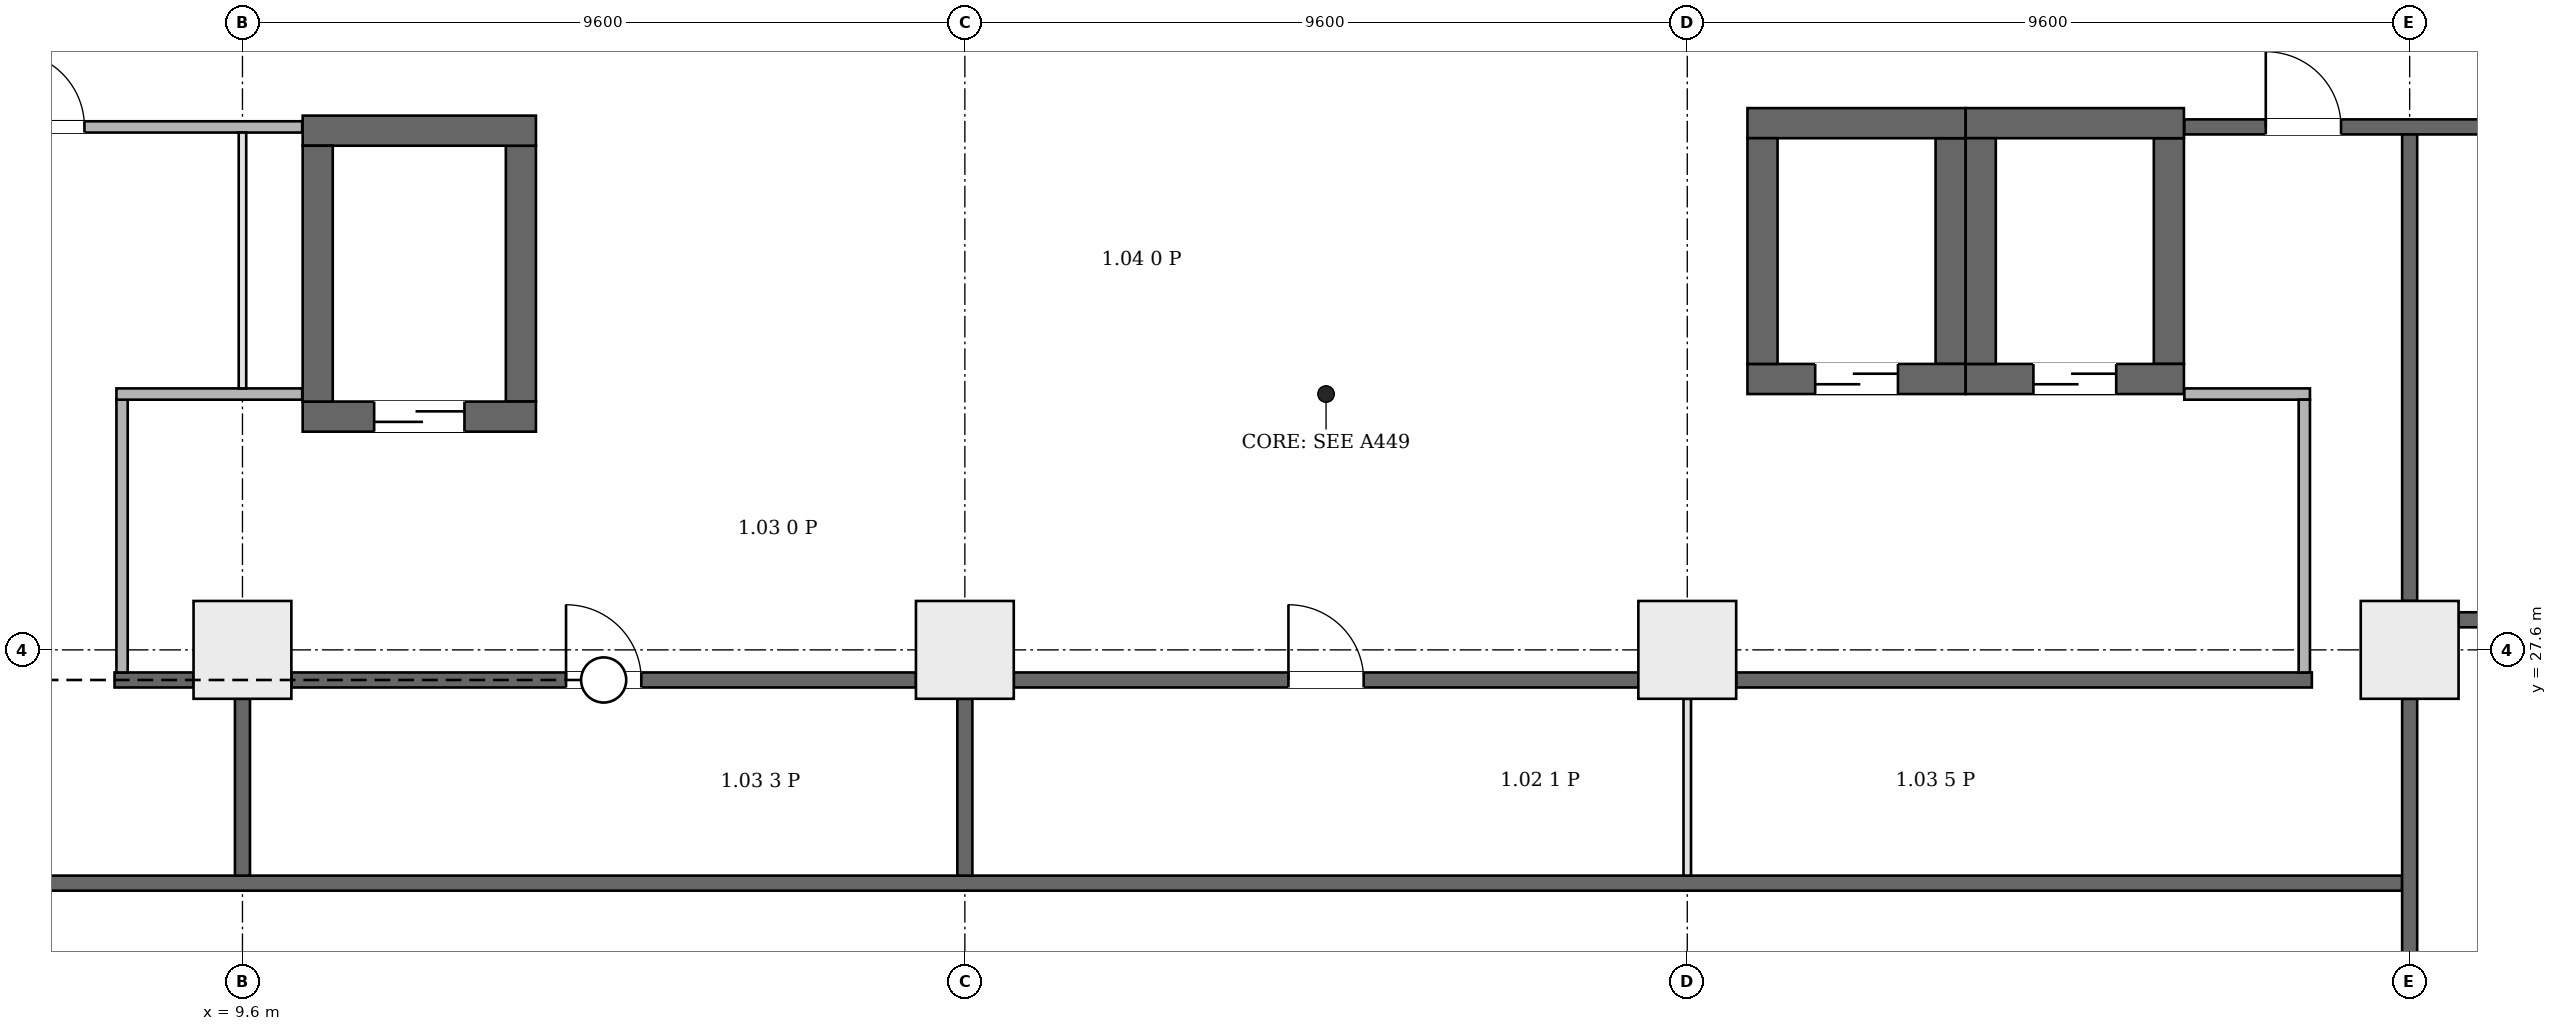
"""IFC4 building model, lengths in metres.
Left out: names, types, materials, properties, quantities, classifications, styles, units other than length and angle.
Written with IfcOpenShell. Run it as: python <this file> out.ifc"""

import sys

from ifc_helpers import new_model, si_unit, direction, frame, frame_2d, origin, origin_2d, place, context, subcontext, project, spatial, rectangle, extrude, element, fill, save


model = new_model("IFC4")
c1 = context("Model", 3, precision=1e-05, world=origin(), true_north=direction((0.0, 1.0)))
c2 = subcontext(c1, "Body", "Model", "MODEL_VIEW")
j1 = project(units=[si_unit("LENGTHUNIT", "METRE"), si_unit("PLANEANGLEUNIT", "RADIAN")], contexts=[c1])
p1 = place(None, origin())
s1 = spatial("IfcSite", under=j1, at=p1, CompositionType="ELEMENT")
p2 = place(p1, origin())
s2 = spatial("IfcBuilding", under=s1, at=p2, CompositionType="ELEMENT")
p3 = place(p2, frame((0.0, 0.0, 6.5)))
s3 = spatial("IfcBuildingStorey", under=s2, at=p3, CompositionType="ELEMENT", Elevation=6.5)
p4 = place(p3, frame((10.4, 30.7, 0.0), z_axis=(0.0, 0.0, 1.0), x_axis=(1.0, 0.0, 0.0)))
e1 = element("IfcWall", 1, at=p4, inside=s3, PredefinedType="SHEAR", context=c2, shape_type="SweptSolid", body=[
    extrude(rectangle(XDim=3.1, YDim=0.4, at=frame_2d((1.55, 0.0))), origin(), (0.0, 0.0, 1.0), 7.7),
])
p5 = place(p4, frame((0.95, 0.0, 0.0)))
e2 = element("IfcOpeningElement", 2, at=p5, cuts=e1, PredefinedType="OPENING", context=c2, shape_type="SweptSolid", body=[
    extrude(rectangle(XDim=1.2, YDim=2.1, at=frame_2d((0.6, 1.05))), frame((0.0, 0.21, 0.0), z_axis=(0.0, -1.0, 0.0), x_axis=(1.0, 0.0, 0.0)), (0.0, 0.0, 1.0), 0.42),
])
p6 = place(p3, frame((10.4, 34.5, 0.0), z_axis=(0.0, 0.0, 1.0), x_axis=(1.0, 0.0, 0.0)))
e3 = element("IfcWall", 3, at=p6, inside=s3, PredefinedType="SHEAR", context=c2, shape_type="SweptSolid", body=[
    extrude(rectangle(XDim=3.1, YDim=0.4, at=frame_2d((1.55, 0.0))), origin(), (0.0, 0.0, 1.0), 7.7),
])
for number, where, z_axis, x_axis in (
    (4, (10.6, 30.9, 0.0), (0.0, 0.0, 1.0), (0.0, 1.0, 0.0)),
    (5, (13.3, 30.9, 0.0), (0.0, 0.0, 1.0), (0.0, 1.0, 0.0)),
):
    element("IfcWall", number, at=place(p3, frame(where, z_axis=z_axis, x_axis=x_axis)), inside=s3, PredefinedType="SHEAR", context=c2, shape_type="SweptSolid", body=[
        extrude(rectangle(XDim=3.4, YDim=0.4, at=frame_2d((1.7, 0.0))), origin(), (0.0, 0.0, 1.0), 7.7),
    ])
p7 = place(p3, frame((29.6, 31.2, 0.0), z_axis=(0.0, 0.0, 1.0), x_axis=(1.0, 0.0, 0.0)))
e6 = element("IfcWall", 6, at=p7, inside=s3, PredefinedType="SHEAR", context=c2, shape_type="SweptSolid", body=[
    extrude(rectangle(XDim=2.9, YDim=0.4, at=frame_2d((1.45, 0.0))), origin(), (0.0, 0.0, 1.0), 7.7),
])
p8 = place(p7, frame((0.9, 0.0, 0.0)))
e7 = element("IfcOpeningElement", 7, at=p8, cuts=e6, PredefinedType="OPENING", context=c2, shape_type="SweptSolid", body=[
    extrude(rectangle(XDim=1.1, YDim=2.1, at=frame_2d((0.55, 1.05))), frame((0.0, 0.21, 0.0), z_axis=(0.0, -1.0, 0.0), x_axis=(1.0, 0.0, 0.0)), (0.0, 0.0, 1.0), 0.42),
])
p9 = place(p3, frame((29.6, 34.6, 0.0), z_axis=(0.0, 0.0, 1.0), x_axis=(1.0, 0.0, 0.0)))
e8 = element("IfcWall", 8, at=p9, inside=s3, PredefinedType="SHEAR", context=c2, shape_type="SweptSolid", body=[
    extrude(rectangle(XDim=2.9, YDim=0.4, at=frame_2d((1.45, 0.0))), origin(), (0.0, 0.0, 1.0), 7.7),
])
for number, where, z_axis, x_axis in (
    (9, (29.8, 31.4, 0.0), (0.0, 0.0, 1.0), (0.0, 1.0, 0.0)),
    (10, (32.3, 31.4, 0.0), (0.0, 0.0, 1.0), (0.0, 1.0, 0.0)),
):
    element("IfcWall", number, at=place(p3, frame(where, z_axis=z_axis, x_axis=x_axis)), inside=s3, PredefinedType="SHEAR", context=c2, shape_type="SweptSolid", body=[
        extrude(rectangle(XDim=3.0, YDim=0.4, at=frame_2d((1.5, 0.0))), origin(), (0.0, 0.0, 1.0), 7.7),
    ])
p10 = place(p3, frame((32.5, 31.2, 0.0), z_axis=(0.0, 0.0, 1.0), x_axis=(1.0, 0.0, 0.0)))
e11 = element("IfcWall", 11, at=p10, inside=s3, PredefinedType="SHEAR", context=c2, shape_type="SweptSolid", body=[
    extrude(rectangle(XDim=2.9, YDim=0.4, at=frame_2d((1.45, 0.0))), origin(), (0.0, 0.0, 1.0), 7.7),
])
p11 = place(p10, frame((0.9, 0.0, 0.0)))
e12 = element("IfcOpeningElement", 12, at=p11, cuts=e11, PredefinedType="OPENING", context=c2, shape_type="SweptSolid", body=[
    extrude(rectangle(XDim=1.1, YDim=2.1, at=frame_2d((0.55, 1.05))), frame((0.0, 0.21, 0.0), z_axis=(0.0, -1.0, 0.0), x_axis=(1.0, 0.0, 0.0)), (0.0, 0.0, 1.0), 0.42),
])
p12 = place(p3, frame((32.5, 34.6, 0.0), z_axis=(0.0, 0.0, 1.0), x_axis=(1.0, 0.0, 0.0)))
e13 = element("IfcWall", 13, at=p12, inside=s3, PredefinedType="SHEAR", context=c2, shape_type="SweptSolid", body=[
    extrude(rectangle(XDim=2.9, YDim=0.4, at=frame_2d((1.45, 0.0))), origin(), (0.0, 0.0, 1.0), 7.7),
])
for number, where, z_axis, x_axis in (
    (14, (32.7, 31.4, 0.0), (0.0, 0.0, 1.0), (0.0, 1.0, 0.0)),
    (15, (35.2, 31.4, 0.0), (0.0, 0.0, 1.0), (0.0, 1.0, 0.0)),
):
    element("IfcWall", number, at=place(p3, frame(where, z_axis=z_axis, x_axis=x_axis)), inside=s3, PredefinedType="SHEAR", context=c2, shape_type="SweptSolid", body=[
        extrude(rectangle(XDim=3.0, YDim=0.4, at=frame_2d((1.5, 0.0))), origin(), (0.0, 0.0, 1.0), 7.7),
    ])
for number, where, z_axis, x_axis in (
    (16, (9.6, 27.6, 0.0), (0.0, 0.0, 1.0), (1.0, 0.0, 0.0)),
    (17, (19.2, 27.6, 0.0), (0.0, 0.0, 1.0), (1.0, 0.0, 0.0)),
    (18, (28.8, 27.6, 0.0), (0.0, 0.0, 1.0), (1.0, 0.0, 0.0)),
    (19, (38.4, 27.6, 0.0), (0.0, 0.0, 1.0), (1.0, 0.0, 0.0)),
):
    element("IfcColumn", number, at=place(p3, frame(where, z_axis=z_axis, x_axis=x_axis)), inside=s3, PredefinedType="COLUMN", context=c2, shape_type="SweptSolid", body=[
        extrude(rectangle(XDim=1.3, YDim=1.3, at=origin_2d()), origin(), (0.0, 0.0, 1.0), 7.7),
    ])
p13 = place(p3, frame((0.206, 24.5, 0.0), z_axis=(0.0, 0.0, 1.0), x_axis=(1.0, 0.0, 0.0)))
e20 = element("IfcWall", 20, at=p13, inside=s3, PredefinedType="PARTITIONING", context=c2, shape_type="SweptSolid", body=[
    extrude(rectangle(XDim=38.094, YDim=0.2, at=frame_2d((19.047, 0.0))), origin(), (0.0, 0.0, 1.0), 7.35),
])
p14 = place(p3, frame((2.706, 34.55, 0.0), z_axis=(0.0, 0.0, 1.0), x_axis=(1.0, 0.0, 0.0)))
e21 = element("IfcWall", 21, at=p14, inside=s3, PredefinedType="PARTITIONING", context=c2, shape_type="SweptSolid", body=[
    extrude(rectangle(XDim=7.688, YDim=0.15, at=frame_2d((3.844, 0.0))), origin(), (0.0, 0.0, 1.0), 7.35),
])
p15 = place(p14, frame((3.794, 0.0, 0.0)))
e22 = element("IfcOpeningElement", 22, at=p15, cuts=e21, PredefinedType="OPENING", context=c2, shape_type="SweptSolid", body=[
    extrude(rectangle(XDim=1.0, YDim=2.1, at=frame_2d((0.5, 1.05))), frame((0.0, 0.085, 0.0), z_axis=(0.0, -1.0, 0.0), x_axis=(1.0, 0.0, 0.0)), (0.0, 0.0, 1.0), 0.17),
])
p16 = place(p3, frame((7.9, 27.2, 0.0), z_axis=(0.0, 0.0, 1.0), x_axis=(1.0, 0.0, 0.0)))
e23 = element("IfcWall", 23, at=p16, inside=s3, PredefinedType="PARTITIONING", context=c2, shape_type="SweptSolid", body=[
    extrude(rectangle(XDim=1.05, YDim=0.2, at=frame_2d((0.525, 0.0))), origin(), (0.0, 0.0, 1.0), 7.35),
])
p17 = place(p3, frame((8.0, 27.3, 0.0), z_axis=(0.0, 0.0, 1.0), x_axis=(0.0, 1.0, 0.0)))
e24 = element("IfcWall", 24, at=p17, inside=s3, PredefinedType="PARTITIONING", context=c2, shape_type="SweptSolid", body=[
    extrude(rectangle(XDim=3.625, YDim=0.15, at=frame_2d((1.812, 0.0))), origin(), (0.0, 0.0, 1.0), 7.35),
])
p18 = place(p3, frame((7.925, 31.0, 0.0), z_axis=(0.0, 0.0, 1.0), x_axis=(1.0, 0.0, 0.0)))
e25 = element("IfcWall", 25, at=p18, inside=s3, PredefinedType="PARTITIONING", context=c2, shape_type="SweptSolid", body=[
    extrude(rectangle(XDim=2.469, YDim=0.15, at=frame_2d((1.234, 0.0))), origin(), (0.0, 0.0, 1.0), 7.35),
])
p19 = place(p3, frame((9.6, 24.6, 0.0), z_axis=(0.0, 0.0, 1.0), x_axis=(0.0, 1.0, 0.0)))
e26 = element("IfcWall", 26, at=p19, inside=s3, PredefinedType="PARTITIONING", context=c2, shape_type="SweptSolid", body=[
    extrude(rectangle(XDim=2.35, YDim=0.2, at=frame_2d((1.175, 0.0))), origin(), (0.0, 0.0, 1.0), 6.95),
])
p20 = place(p3, frame((9.6, 31.075, 0.0), z_axis=(0.0, 0.0, 1.0), x_axis=(0.0, 1.0, 0.0)))
e27 = element("IfcWall", 27, at=p20, inside=s3, PredefinedType="PARTITIONING", context=c2, shape_type="SweptSolid", body=[
    extrude(rectangle(XDim=3.4, YDim=0.1, at=frame_2d((1.7, 0.0))), origin(), (0.0, 0.0, 1.0), 6.95),
])
p21 = place(p3, frame((10.25, 27.2, 0.0), z_axis=(0.0, 0.0, 1.0), x_axis=(1.0, 0.0, 0.0)))
e28 = element("IfcWall", 28, at=p21, inside=s3, PredefinedType="PARTITIONING", context=c2, shape_type="SweptSolid", body=[
    extrude(rectangle(XDim=8.3, YDim=0.2, at=frame_2d((4.15, 0.0))), origin(), (0.0, 0.0, 1.0), 7.35),
])
p22 = place(p21, frame((3.65, 0.0, 0.0)))
e29 = element("IfcOpeningElement", 29, at=p22, cuts=e28, PredefinedType="OPENING", context=c2, shape_type="SweptSolid", body=[
    extrude(rectangle(XDim=1.0, YDim=2.1, at=frame_2d((0.5, 1.05))), frame((0.0, 0.11, 0.0), z_axis=(0.0, -1.0, 0.0), x_axis=(1.0, 0.0, 0.0)), (0.0, 0.0, 1.0), 0.22),
])
p23 = place(p3, frame((19.2, 24.6, 0.0), z_axis=(0.0, 0.0, 1.0), x_axis=(0.0, 1.0, 0.0)))
e30 = element("IfcWall", 30, at=p23, inside=s3, PredefinedType="PARTITIONING", context=c2, shape_type="SweptSolid", body=[
    extrude(rectangle(XDim=2.35, YDim=0.2, at=frame_2d((1.175, 0.0))), origin(), (0.0, 0.0, 1.0), 6.95),
])
p24 = place(p3, frame((19.85, 27.2, 0.0), z_axis=(0.0, 0.0, 1.0), x_axis=(1.0, 0.0, 0.0)))
e31 = element("IfcWall", 31, at=p24, inside=s3, PredefinedType="PARTITIONING", context=c2, shape_type="SweptSolid", body=[
    extrude(rectangle(XDim=8.3, YDim=0.2, at=frame_2d((4.15, 0.0))), origin(), (0.0, 0.0, 1.0), 7.35),
])
p25 = place(p24, frame((3.65, 0.0, 0.0)))
e32 = element("IfcOpeningElement", 32, at=p25, cuts=e31, PredefinedType="OPENING", context=c2, shape_type="SweptSolid", body=[
    extrude(rectangle(XDim=1.0, YDim=2.1, at=frame_2d((0.5, 1.05))), frame((0.0, 0.11, 0.0), z_axis=(0.0, -1.0, 0.0), x_axis=(1.0, 0.0, 0.0)), (0.0, 0.0, 1.0), 0.22),
])
p26 = place(p3, frame((28.8, 24.6, 0.0), z_axis=(0.0, 0.0, 1.0), x_axis=(0.0, 1.0, 0.0)))
e33 = element("IfcWall", 33, at=p26, inside=s3, PredefinedType="PARTITIONING", context=c2, shape_type="SweptSolid", body=[
    extrude(rectangle(XDim=2.35, YDim=0.1, at=frame_2d((1.175, 0.0))), origin(), (0.0, 0.0, 1.0), 6.95),
])
p27 = place(p3, frame((29.45, 27.2, 0.0), z_axis=(0.0, 0.0, 1.0), x_axis=(1.0, 0.0, 0.0)))
e34 = element("IfcWall", 34, at=p27, inside=s3, PredefinedType="PARTITIONING", context=c2, shape_type="SweptSolid", body=[
    extrude(rectangle(XDim=7.65, YDim=0.2, at=frame_2d((3.825, 0.0))), origin(), (0.0, 0.0, 1.0), 7.35),
])
p28 = place(p3, frame((35.406, 31.0, 0.0), z_axis=(0.0, 0.0, 1.0), x_axis=(1.0, 0.0, 0.0)))
e35 = element("IfcWall", 35, at=p28, inside=s3, PredefinedType="PARTITIONING", context=c2, shape_type="SweptSolid", body=[
    extrude(rectangle(XDim=1.669, YDim=0.15, at=frame_2d((0.834, 0.0))), origin(), (0.0, 0.0, 1.0), 7.35),
])
p29 = place(p3, frame((35.406, 34.55, 0.0), z_axis=(0.0, 0.0, 1.0), x_axis=(1.0, 0.0, 0.0)))
e36 = element("IfcWall", 36, at=p29, inside=s3, PredefinedType="PARTITIONING", context=c2, shape_type="SweptSolid", body=[
    extrude(rectangle(XDim=19.194, YDim=0.2, at=frame_2d((9.597, 0.0))), origin(), (0.0, 0.0, 1.0), 7.35),
])
p30 = place(p29, frame((1.082, 0.0, 0.0)))
e37 = element("IfcOpeningElement", 37, at=p30, cuts=e36, PredefinedType="OPENING", context=c2, shape_type="SweptSolid", body=[
    extrude(rectangle(XDim=1.0, YDim=2.1, at=frame_2d((0.5, 1.05))), frame((0.0, 0.11, 0.0), z_axis=(0.0, -1.0, 0.0), x_axis=(1.0, 0.0, 0.0)), (0.0, 0.0, 1.0), 0.22),
])
p31 = place(p29, frame((10.509, 0.0, 0.0)))
e38 = element("IfcOpeningElement", 38, at=p31, cuts=e36, PredefinedType="OPENING", context=c2, shape_type="SweptSolid", body=[
    extrude(rectangle(XDim=1.0, YDim=2.1, at=frame_2d((0.5, 1.05))), frame((0.0, 0.11, 0.0), z_axis=(0.0, -1.0, 0.0), x_axis=(1.0, 0.0, 0.0)), (0.0, 0.0, 1.0), 0.22),
])
p32 = place(p3, frame((37.0, 27.3, 0.0), z_axis=(0.0, 0.0, 1.0), x_axis=(0.0, 1.0, 0.0)))
e39 = element("IfcWall", 39, at=p32, inside=s3, PredefinedType="PARTITIONING", context=c2, shape_type="SweptSolid", body=[
    extrude(rectangle(XDim=3.625, YDim=0.15, at=frame_2d((1.812, 0.0))), origin(), (0.0, 0.0, 1.0), 7.35),
])
p33 = place(p3, frame((38.4, 19.05, 0.0), z_axis=(0.0, 0.0, 1.0), x_axis=(0.0, 1.0, 0.0)))
e40 = element("IfcWall", 40, at=p33, inside=s3, PredefinedType="PARTITIONING", context=c2, shape_type="SweptSolid", body=[
    extrude(rectangle(XDim=7.9, YDim=0.2, at=frame_2d((3.95, 0.0))), origin(), (0.0, 0.0, 1.0), 6.95),
])
p34 = place(p33, frame((3.45, 0.0, 0.0)))
e41 = element("IfcOpeningElement", 41, at=p34, cuts=e40, PredefinedType="OPENING", context=c2, shape_type="SweptSolid", body=[
    extrude(rectangle(XDim=1.0, YDim=2.1, at=frame_2d((0.5, 1.05))), frame((0.0, 0.11, 0.0), z_axis=(0.0, -1.0, 0.0), x_axis=(1.0, 0.0, 0.0)), (0.0, 0.0, 1.0), 0.22),
])
p35 = place(p3, frame((38.4, 28.25, 0.0), z_axis=(0.0, 0.0, 1.0), x_axis=(0.0, 1.0, 0.0)))
e42 = element("IfcWall", 42, at=p35, inside=s3, PredefinedType="PARTITIONING", context=c2, shape_type="SweptSolid", body=[
    extrude(rectangle(XDim=6.2, YDim=0.2, at=frame_2d((3.1, 0.0))), origin(), (0.0, 0.0, 1.0), 6.95),
])
p36 = place(p3, frame((39.05, 28.0, 0.0), z_axis=(0.0, 0.0, 1.0), x_axis=(1.0, 0.0, 0.0)))
e43 = element("IfcWall", 43, at=p36, inside=s3, PredefinedType="PARTITIONING", context=c2, shape_type="SweptSolid", body=[
    extrude(rectangle(XDim=8.3, YDim=0.2, at=frame_2d((4.15, 0.0))), origin(), (0.0, 0.0, 1.0), 7.35),
])
p37 = place(p5, origin())
e44 = element("IfcDoor", 44, at=p37, inside=s3, OperationType="DOUBLE_DOOR_SLIDING", PredefinedType="DOOR", context=c2, shape_type="SweptSolid", body=[
    extrude(rectangle(XDim=1.2, YDim=2.1, at=frame_2d((0.6, 1.05))), frame((0.0, 0.025, 0.0), z_axis=(0.0, -1.0, 0.0), x_axis=(1.0, 0.0, 0.0)), (0.0, 0.0, 1.0), 0.05),
])
fill(e2, e44)
p38 = place(p8, origin())
e45 = element("IfcDoor", 45, at=p38, inside=s3, OperationType="DOUBLE_DOOR_SLIDING", PredefinedType="DOOR", context=c2, shape_type="SweptSolid", body=[
    extrude(rectangle(XDim=1.1, YDim=2.1, at=frame_2d((0.55, 1.05))), frame((0.0, 0.025, 0.0), z_axis=(0.0, -1.0, 0.0), x_axis=(1.0, 0.0, 0.0)), (0.0, 0.0, 1.0), 0.05),
])
fill(e7, e45)
p39 = place(p11, origin())
e46 = element("IfcDoor", 46, at=p39, inside=s3, OperationType="DOUBLE_DOOR_SLIDING", PredefinedType="DOOR", context=c2, shape_type="SweptSolid", body=[
    extrude(rectangle(XDim=1.1, YDim=2.1, at=frame_2d((0.55, 1.05))), frame((0.0, 0.025, 0.0), z_axis=(0.0, -1.0, 0.0), x_axis=(1.0, 0.0, 0.0)), (0.0, 0.0, 1.0), 0.05),
])
fill(e12, e46)
p40 = place(p15, origin())
e47 = element("IfcDoor", 47, at=p40, inside=s3, OperationType="SINGLE_SWING_LEFT", PredefinedType="DOOR", context=c2, shape_type="SweptSolid", body=[
    extrude(rectangle(XDim=1.0, YDim=2.1, at=frame_2d((0.5, 1.05))), frame((0.0, 0.025, 0.0), z_axis=(0.0, -1.0, 0.0), x_axis=(1.0, 0.0, 0.0)), (0.0, 0.0, 1.0), 0.05),
])
fill(e22, e47)
p41 = place(p22, origin())
e48 = element("IfcDoor", 48, at=p41, inside=s3, OperationType="SINGLE_SWING_RIGHT", PredefinedType="DOOR", context=c2, shape_type="SweptSolid", body=[
    extrude(rectangle(XDim=1.0, YDim=2.1, at=frame_2d((0.5, 1.05))), frame((0.0, 0.025, 0.0), z_axis=(0.0, -1.0, 0.0), x_axis=(1.0, 0.0, 0.0)), (0.0, 0.0, 1.0), 0.05),
])
fill(e29, e48)
p42 = place(p25, origin())
e49 = element("IfcDoor", 49, at=p42, inside=s3, OperationType="SINGLE_SWING_RIGHT", PredefinedType="DOOR", context=c2, shape_type="SweptSolid", body=[
    extrude(rectangle(XDim=1.0, YDim=2.1, at=frame_2d((0.5, 1.05))), frame((0.0, 0.025, 0.0), z_axis=(0.0, -1.0, 0.0), x_axis=(1.0, 0.0, 0.0)), (0.0, 0.0, 1.0), 0.05),
])
fill(e32, e49)
p43 = place(p30, origin())
e50 = element("IfcDoor", 50, at=p43, inside=s3, OperationType="SINGLE_SWING_RIGHT", PredefinedType="DOOR", context=c2, shape_type="SweptSolid", body=[
    extrude(rectangle(XDim=1.0, YDim=2.1, at=frame_2d((0.5, 1.05))), frame((0.0, 0.025, 0.0), z_axis=(0.0, -1.0, 0.0), x_axis=(1.0, 0.0, 0.0)), (0.0, 0.0, 1.0), 0.05),
])
fill(e37, e50)
save(model, sys.argv[1])
